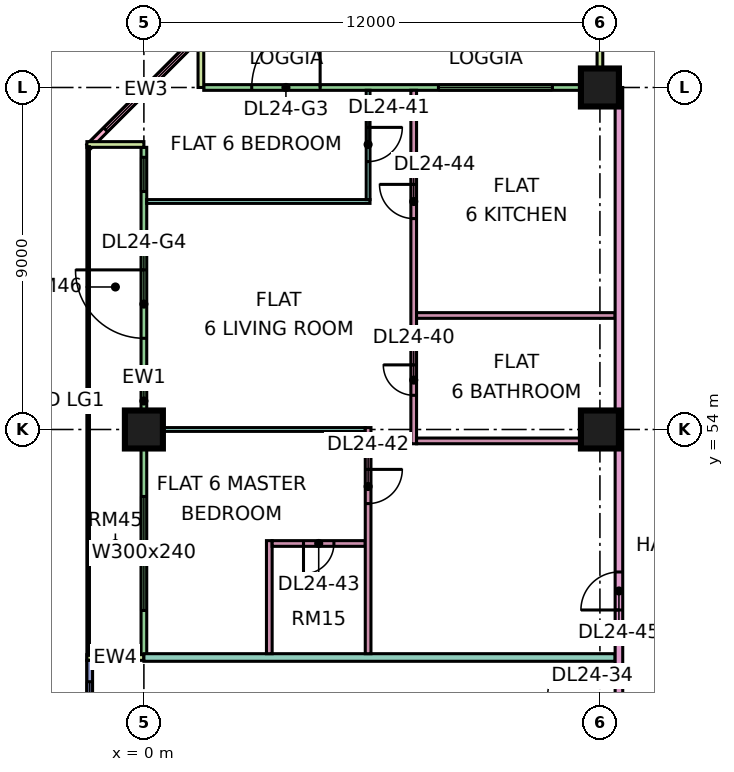
"""IFC4 building model, lengths in metres.
Left out: names, types, materials, properties, quantities, classifications, styles, units other than length and angle.
Written with IfcOpenShell. Run it as: python <this file> out.ifc"""

import sys

from ifc_helpers import new_model, si_unit, direction, frame, frame_2d, origin, origin_2d, place, context, subcontext, project, spatial, rectangle, extrude, element, fill, save


model = new_model("IFC4")
c1 = context("Model", 3, precision=1e-05, world=origin(), true_north=direction((0.0, 1.0)))
c2 = subcontext(c1, "Body", "Model", "MODEL_VIEW")
j1 = project(units=[si_unit("LENGTHUNIT", "METRE"), si_unit("PLANEANGLEUNIT", "RADIAN")], contexts=[c1])
p1 = place(None, origin())
s1 = spatial("IfcSite", under=j1, at=p1, CompositionType="ELEMENT")
p2 = place(p1, origin())
s2 = spatial("IfcBuilding", under=s1, at=p2, CompositionType="ELEMENT")
p3 = place(p2, frame((0.0, 0.0, 106.9)))
s3 = spatial("IfcBuildingStorey", under=s2, at=p3, CompositionType="ELEMENT", Elevation=106.9)
for number, where, z_axis, x_axis in (
    (1, (0.0, 54.0, 0.0), (0.0, 0.0, 1.0), (1.0, 0.0, 0.0)),
    (2, (12.0, 54.0, 0.0), (0.0, 0.0, 1.0), (1.0, 0.0, 0.0)),
    (3, (12.0, 63.0, 0.0), (0.0, 0.0, 1.0), (1.0, 0.0, 0.0)),
):
    element("IfcColumn", number, at=place(p3, frame(where, z_axis=z_axis, x_axis=x_axis)), inside=s3, PredefinedType="COLUMN", context=c2, shape_type="SweptSolid", body=[
        extrude(rectangle(XDim=1.0, YDim=1.0, at=origin_2d()), origin(), (0.0, 0.0, 1.0), 3.75),
    ])
p4 = place(p3, frame((11.925, 63.0, 0.0), z_axis=(0.0, 0.0, 1.0), x_axis=(-1.0, 0.0, 0.0)))
e4 = element("IfcWall", 4, at=p4, inside=s3, PredefinedType="SOLIDWALL", context=c2, shape_type="SweptSolid", body=[
    extrude(rectangle(XDim=10.35, YDim=0.15, at=frame_2d((5.175, 0.0))), origin(), (0.0, 0.0, 1.0), 3.35),
])
p5 = place(p4, frame((1.175, 0.0, 0.45)))
e5 = element("IfcOpeningElement", 5, at=p5, cuts=e4, PredefinedType="OPENING", context=c2, shape_type="SweptSolid", body=[
    extrude(rectangle(XDim=3.0, YDim=2.4, at=frame_2d((1.5, 1.2))), frame((0.0, 0.085, 0.0), z_axis=(0.0, -1.0, 0.0), x_axis=(1.0, 0.0, 0.0)), (0.0, 0.0, 1.0), 0.17),
])
p6 = place(p4, frame((7.288, 0.0, 0.0)))
e6 = element("IfcOpeningElement", 6, at=p6, cuts=e4, PredefinedType="OPENING", context=c2, shape_type="SweptSolid", body=[
    extrude(rectangle(XDim=1.8, YDim=2.4, at=frame_2d((0.9, 1.2))), frame((0.0, 0.085, 0.0), z_axis=(0.0, -1.0, 0.0), x_axis=(1.0, 0.0, 0.0)), (0.0, 0.0, 1.0), 0.17),
])
for number, where, z_axis, x_axis in (
    (7, (12.0, 64.5, 0.0), (0.0, 0.0, 1.0), (0.0, -1.0, 0.0)),
    (8, (1.5, 64.5, 0.0), (0.0, 0.0, 1.0), (0.0, -1.0, 0.0)),
):
    element("IfcWall", number, at=place(p3, frame(where, z_axis=z_axis, x_axis=x_axis)), inside=s3, PredefinedType="SOLIDWALL", context=c2, shape_type="SweptSolid", body=[
        extrude(rectangle(XDim=1.5, YDim=0.15, at=frame_2d((0.75, 0.0))), origin(), (0.0, 0.0, 1.0), 3.35),
    ])
p7 = place(p3, frame((1.553, 64.447, 0.0), z_axis=(0.0, 0.0, 1.0), x_axis=(-0.707106781187, -0.707106781187, 0.0)))
e9 = element("IfcWall", 9, at=p7, inside=s3, PredefinedType="SOLIDWALL", context=c2, shape_type="SweptSolid", body=[
    extrude(rectangle(XDim=4.243, YDim=0.15, at=frame_2d((2.121, 0.0))), origin(), (0.0, 0.0, 1.0), 3.35),
])
p8 = place(p7, frame((0.621, 0.0, 0.45)))
e10 = element("IfcOpeningElement", 10, at=p8, cuts=e9, PredefinedType="OPENING", context=c2, shape_type="SweptSolid", body=[
    extrude(rectangle(XDim=3.0, YDim=2.4, at=frame_2d((1.5, 1.2))), frame((0.0, 0.085, 0.0), z_axis=(0.0, -1.0, 0.0), x_axis=(1.0, 0.0, 0.0)), (0.0, 0.0, 1.0), 0.17),
])
p9 = place(p3, frame((0.0, 61.425, 0.0), z_axis=(0.0, 0.0, 1.0), x_axis=(0.0, -1.0, 0.0)))
e11 = element("IfcWall", 11, at=p9, inside=s3, PredefinedType="SOLIDWALL", context=c2, shape_type="SweptSolid", body=[
    extrude(rectangle(XDim=13.35, YDim=0.15, at=frame_2d((6.675, 0.0))), origin(), (0.0, 0.0, 1.0), 3.35),
])
p10 = place(p9, frame((0.262, 0.0, 0.45)))
e12 = element("IfcOpeningElement", 12, at=p10, cuts=e11, PredefinedType="OPENING", context=c2, shape_type="SweptSolid", body=[
    extrude(rectangle(XDim=0.9, YDim=2.4, at=frame_2d((0.45, 1.2))), frame((0.0, 0.085, 0.0), z_axis=(0.0, -1.0, 0.0), x_axis=(1.0, 0.0, 0.0)), (0.0, 0.0, 1.0), 0.17),
])
p11 = place(p9, frame((3.225, 0.0, 0.0)))
e13 = element("IfcOpeningElement", 13, at=p11, cuts=e11, PredefinedType="OPENING", context=c2, shape_type="SweptSolid", body=[
    extrude(rectangle(XDim=1.8, YDim=2.4, at=frame_2d((0.9, 1.2))), frame((0.0, 0.085, 0.0), z_axis=(0.0, -1.0, 0.0), x_axis=(1.0, 0.0, 0.0)), (0.0, 0.0, 1.0), 0.17),
])
p12 = place(p9, frame((9.188, 0.0, 0.45)))
e14 = element("IfcOpeningElement", 14, at=p12, cuts=e11, PredefinedType="OPENING", context=c2, shape_type="SweptSolid", body=[
    extrude(rectangle(XDim=3.0, YDim=2.4, at=frame_2d((1.5, 1.2))), frame((0.0, 0.085, 0.0), z_axis=(0.0, -1.0, 0.0), x_axis=(1.0, 0.0, 0.0)), (0.0, 0.0, 1.0), 0.17),
])
for number, where, z_axis, x_axis in (
    (15, (-1.5, 61.5, 0.0), (0.0, 0.0, 1.0), (1.0, 0.0, 0.0)),
    (16, (-1.5, 48.0, 0.0), (0.0, 0.0, 1.0), (1.0, 0.0, 0.0)),
):
    element("IfcWall", number, at=place(p3, frame(where, z_axis=z_axis, x_axis=x_axis)), inside=s3, PredefinedType="SOLIDWALL", context=c2, shape_type="SweptSolid", body=[
        extrude(rectangle(XDim=1.5, YDim=0.15, at=frame_2d((0.75, 0.0))), origin(), (0.0, 0.0, 1.0), 3.35),
    ])
p13 = place(p3, frame((-1.425, 47.925, 0.0), z_axis=(0.0, 0.0, 1.0), x_axis=(0.0, -1.0, 0.0)))
e17 = element("IfcWall", 17, at=p13, inside=s3, PredefinedType="SOLIDWALL", context=c2, shape_type="SweptSolid", body=[
    extrude(rectangle(XDim=11.85, YDim=0.15, at=frame_2d((5.925, 0.0))), origin(), (0.0, 0.0, 1.0), 3.35),
])
p14 = place(p13, frame((0.562, 0.0, 0.45)))
e18 = element("IfcOpeningElement", 18, at=p14, cuts=e17, PredefinedType="OPENING", context=c2, shape_type="SweptSolid", body=[
    extrude(rectangle(XDim=1.8, YDim=2.4, at=frame_2d((0.9, 1.2))), frame((0.0, 0.085, 0.0), z_axis=(0.0, -1.0, 0.0), x_axis=(1.0, 0.0, 0.0)), (0.0, 0.0, 1.0), 0.17),
])
p15 = place(p13, frame((4.425, 0.0, 0.45)))
e19 = element("IfcOpeningElement", 19, at=p15, cuts=e17, PredefinedType="OPENING", context=c2, shape_type="SweptSolid", body=[
    extrude(rectangle(XDim=3.0, YDim=2.4, at=frame_2d((1.5, 1.2))), frame((0.0, 0.085, 0.0), z_axis=(0.0, -1.0, 0.0), x_axis=(1.0, 0.0, 0.0)), (0.0, 0.0, 1.0), 0.17),
])
p16 = place(p13, frame((9.488, 0.0, 0.45)))
e20 = element("IfcOpeningElement", 20, at=p16, cuts=e17, PredefinedType="OPENING", context=c2, shape_type="SweptSolid", body=[
    extrude(rectangle(XDim=1.8, YDim=2.4, at=frame_2d((0.9, 1.2))), frame((0.0, 0.085, 0.0), z_axis=(0.0, -1.0, 0.0), x_axis=(1.0, 0.0, 0.0)), (0.0, 0.0, 1.0), 0.17),
])
p17 = place(p3, frame((0.0, 48.0, 0.0), z_axis=(0.0, 0.0, 1.0), x_axis=(1.0, 0.0, 0.0)))
e21 = element("IfcWall", 21, at=p17, inside=s3, PredefinedType="PARTITIONING", context=c2, shape_type="SweptSolid", body=[
    extrude(rectangle(XDim=12.4, YDim=0.2, at=frame_2d((6.2, 0.0))), origin(), (0.0, 0.0, 1.0), 3.35),
])
p18 = place(p3, frame((0.074, 54.0, 0.0), z_axis=(0.0, 0.0, 1.0), x_axis=(1.0, 0.0, 0.0)))
e22 = element("IfcWall", 22, at=p18, inside=s3, PredefinedType="PARTITIONING", context=c2, shape_type="SweptSolid", body=[
    extrude(rectangle(XDim=5.751, YDim=0.1, at=frame_2d((2.875, 0.0))), origin(), (0.0, 0.0, 1.0), 3.35),
])
p19 = place(p3, frame((0.074, 60.0, 0.0), z_axis=(0.0, 0.0, 1.0), x_axis=(1.0, 0.0, 0.0)))
e23 = element("IfcWall", 23, at=p19, inside=s3, PredefinedType="PARTITIONING", context=c2, shape_type="SweptSolid", body=[
    extrude(rectangle(XDim=5.876, YDim=0.1, at=frame_2d((2.938, 0.0))), origin(), (0.0, 0.0, 1.0), 3.35),
])
p20 = place(p3, frame((3.3, 48.1, 0.0), z_axis=(0.0, 0.0, 1.0), x_axis=(0.0, 1.0, 0.0)))
e24 = element("IfcWall", 24, at=p20, inside=s3, PredefinedType="PARTITIONING", context=c2, shape_type="SweptSolid", body=[
    extrude(rectangle(XDim=2.975, YDim=0.15, at=frame_2d((1.487, 0.0))), origin(), (0.0, 0.0, 1.0), 3.35),
])
p21 = place(p3, frame((3.375, 51.0, 0.0), z_axis=(0.0, 0.0, 1.0), x_axis=(1.0, 0.0, 0.0)))
e25 = element("IfcWall", 25, at=p21, inside=s3, PredefinedType="PARTITIONING", context=c2, shape_type="SweptSolid", body=[
    extrude(rectangle(XDim=2.45, YDim=0.15, at=frame_2d((1.225, 0.0))), origin(), (0.0, 0.0, 1.0), 3.35),
])
p22 = place(p21, frame((0.825, 0.0, 0.0)))
e26 = element("IfcOpeningElement", 26, at=p22, cuts=e25, PredefinedType="OPENING", context=c2, shape_type="SweptSolid", body=[
    extrude(rectangle(XDim=0.8, YDim=2.1, at=frame_2d((0.4, 1.05))), frame((0.0, 0.085, 0.0), z_axis=(0.0, -1.0, 0.0), x_axis=(1.0, 0.0, 0.0)), (0.0, 0.0, 1.0), 0.17),
])
p23 = place(p3, frame((5.9, 48.1, 0.0), z_axis=(0.0, 0.0, 1.0), x_axis=(0.0, 1.0, 0.0)))
e27 = element("IfcWall", 27, at=p23, inside=s3, PredefinedType="PARTITIONING", context=c2, shape_type="SweptSolid", body=[
    extrude(rectangle(XDim=5.95, YDim=0.15, at=frame_2d((2.975, 0.0))), origin(), (0.0, 0.0, 1.0), 3.35),
])
p24 = place(p23, frame((3.95, 0.0, 0.0)))
e28 = element("IfcOpeningElement", 28, at=p24, cuts=e27, PredefinedType="OPENING", context=c2, shape_type="SweptSolid", body=[
    extrude(rectangle(XDim=0.9, YDim=2.1, at=frame_2d((0.45, 1.05))), frame((0.0, 0.085, 0.0), z_axis=(0.0, -1.0, 0.0), x_axis=(1.0, 0.0, 0.0)), (0.0, 0.0, 1.0), 0.17),
])
p25 = place(p3, frame((5.9, 60.05, 0.0), z_axis=(0.0, 0.0, 1.0), x_axis=(0.0, 1.0, 0.0)))
e29 = element("IfcWall", 29, at=p25, inside=s3, PredefinedType="PARTITIONING", context=c2, shape_type="SweptSolid", body=[
    extrude(rectangle(XDim=2.876, YDim=0.1, at=frame_2d((1.438, 0.0))), origin(), (0.0, 0.0, 1.0), 3.35),
])
p26 = place(p25, frame((1.0, 0.0, 0.0)))
e30 = element("IfcOpeningElement", 30, at=p26, cuts=e29, PredefinedType="OPENING", context=c2, shape_type="SweptSolid", body=[
    extrude(rectangle(XDim=0.9, YDim=2.1, at=frame_2d((0.45, 1.05))), frame((0.0, 0.06, 0.0), z_axis=(0.0, -1.0, 0.0), x_axis=(1.0, 0.0, 0.0)), (0.0, 0.0, 1.0), 0.12),
])
p27 = place(p3, frame((7.1, 53.625, 0.0), z_axis=(0.0, 0.0, 1.0), x_axis=(0.0, 1.0, 0.0)))
e31 = element("IfcWall", 31, at=p27, inside=s3, PredefinedType="PARTITIONING", context=c2, shape_type="SweptSolid", body=[
    extrude(rectangle(XDim=9.301, YDim=0.15, at=frame_2d((4.65, 0.0))), origin(), (0.0, 0.0, 1.0), 3.35),
])
p28 = place(p27, frame((1.275, 0.0, 0.0)))
e32 = element("IfcOpeningElement", 32, at=p28, cuts=e31, PredefinedType="OPENING", context=c2, shape_type="SweptSolid", body=[
    extrude(rectangle(XDim=0.8, YDim=2.1, at=frame_2d((0.4, 1.05))), frame((0.0, 0.085, 0.0), z_axis=(0.0, -1.0, 0.0), x_axis=(1.0, 0.0, 0.0)), (0.0, 0.0, 1.0), 0.17),
])
p29 = place(p27, frame((5.925, 0.0, 0.0)))
e33 = element("IfcOpeningElement", 33, at=p29, cuts=e31, PredefinedType="OPENING", context=c2, shape_type="SweptSolid", body=[
    extrude(rectangle(XDim=0.9, YDim=2.1, at=frame_2d((0.45, 1.05))), frame((0.0, 0.085, 0.0), z_axis=(0.0, -1.0, 0.0), x_axis=(1.0, 0.0, 0.0)), (0.0, 0.0, 1.0), 0.17),
])
for number, where, z_axis, x_axis in (
    (34, (7.175, 53.7, 0.0), (0.0, 0.0, 1.0), (1.0, 0.0, 0.0)),
    (35, (7.175, 57.0, 0.0), (0.0, 0.0, 1.0), (1.0, 0.0, 0.0)),
):
    element("IfcWall", number, at=place(p3, frame(where, z_axis=z_axis, x_axis=x_axis)), inside=s3, PredefinedType="PARTITIONING", context=c2, shape_type="SweptSolid", body=[
        extrude(rectangle(XDim=5.225, YDim=0.15, at=frame_2d((2.612, 0.0))), origin(), (0.0, 0.0, 1.0), 3.35),
    ])
p30 = place(p3, frame((12.5, 20.0, 0.0), z_axis=(0.0, 0.0, 1.0), x_axis=(0.0, 1.0, 0.0)))
e36 = element("IfcWall", 36, at=p30, inside=s3, PredefinedType="PARTITIONING", context=c2, shape_type="SweptSolid", body=[
    extrude(rectangle(XDim=43.0, YDim=0.2, at=frame_2d((21.5, 0.0))), origin(), (0.0, 0.0, 1.0), 3.35),
])
p31 = place(p30, frame((25.95, 0.0, 0.0)))
e37 = element("IfcOpeningElement", 37, at=p31, cuts=e36, PredefinedType="OPENING", context=c2, shape_type="SweptSolid", body=[
    extrude(rectangle(XDim=1.0, YDim=2.1, at=frame_2d((0.5, 1.05))), frame((0.0, 0.11, 0.0), z_axis=(0.0, -1.0, 0.0), x_axis=(1.0, 0.0, 0.0)), (0.0, 0.0, 1.0), 0.22),
])
p32 = place(p30, frame((29.25, 0.0, 0.0)))
e38 = element("IfcOpeningElement", 38, at=p32, cuts=e36, PredefinedType="OPENING", context=c2, shape_type="SweptSolid", body=[
    extrude(rectangle(XDim=1.0, YDim=2.1, at=frame_2d((0.5, 1.05))), frame((0.0, 0.11, 0.0), z_axis=(0.0, -1.0, 0.0), x_axis=(1.0, 0.0, 0.0)), (0.0, 0.0, 1.0), 0.22),
])
p33 = place(p30, frame((0.6, 0.0, 0.0)))
e39 = element("IfcOpeningElement", 39, at=p33, cuts=e36, PredefinedType="OPENING", context=c2, shape_type="SweptSolid", body=[
    extrude(rectangle(XDim=1.2, YDim=2.1, at=frame_2d((0.6, 1.05))), frame((0.0, 0.11, 0.0), z_axis=(0.0, -1.0, 0.0), x_axis=(1.0, 0.0, 0.0)), (0.0, 0.0, 1.0), 0.22),
])
p34 = place(p30, frame((4.65, 0.0, 0.0)))
e40 = element("IfcOpeningElement", 40, at=p34, cuts=e36, PredefinedType="OPENING", context=c2, shape_type="SweptSolid", body=[
    extrude(rectangle(XDim=1.0, YDim=2.1, at=frame_2d((0.5, 1.05))), frame((0.0, 0.11, 0.0), z_axis=(0.0, -1.0, 0.0), x_axis=(1.0, 0.0, 0.0)), (0.0, 0.0, 1.0), 0.22),
])
p35 = place(p5, origin())
e41 = element("IfcWindow", 41, at=p35, inside=s3, PartitioningType="SINGLE_PANEL", PredefinedType="WINDOW", context=c2, shape_type="SweptSolid", body=[
    extrude(rectangle(XDim=3.0, YDim=2.4, at=frame_2d((1.5, 1.2))), frame((0.0, 0.03, 0.0), z_axis=(0.0, -1.0, 0.0), x_axis=(1.0, 0.0, 0.0)), (0.0, 0.0, 1.0), 0.06),
])
fill(e5, e41)
p36 = place(p6, frame((1.8, 0.0, 0.0), z_axis=(0.0, 0.0, 1.0), x_axis=(-1.0, 0.0, 0.0)))
e42 = element("IfcDoor", 42, at=p36, inside=s3, OperationType="DOUBLE_DOOR_SINGLE_SWING", PredefinedType="DOOR", context=c2, shape_type="SweptSolid", body=[
    extrude(rectangle(XDim=1.8, YDim=2.4, at=frame_2d((0.9, 1.2))), frame((0.0, 0.025, 0.0), z_axis=(0.0, -1.0, 0.0), x_axis=(1.0, 0.0, 0.0)), (0.0, 0.0, 1.0), 0.05),
])
fill(e6, e42)
p37 = place(p8, origin())
e43 = element("IfcWindow", 43, at=p37, inside=s3, PartitioningType="SINGLE_PANEL", PredefinedType="WINDOW", context=c2, shape_type="SweptSolid", body=[
    extrude(rectangle(XDim=3.0, YDim=2.4, at=frame_2d((1.5, 1.2))), frame((0.0, 0.03, 0.0), z_axis=(0.0, -1.0, 0.0), x_axis=(1.0, 0.0, 0.0)), (0.0, 0.0, 1.0), 0.06),
])
fill(e10, e43)
p38 = place(p10, origin())
e44 = element("IfcWindow", 44, at=p38, inside=s3, PartitioningType="SINGLE_PANEL", PredefinedType="WINDOW", context=c2, shape_type="SweptSolid", body=[
    extrude(rectangle(XDim=0.9, YDim=2.4, at=frame_2d((0.45, 1.2))), frame((0.0, 0.03, 0.0), z_axis=(0.0, -1.0, 0.0), x_axis=(1.0, 0.0, 0.0)), (0.0, 0.0, 1.0), 0.06),
])
fill(e12, e44)
p39 = place(p11, frame((1.8, 0.0, 0.0), z_axis=(0.0, 0.0, 1.0), x_axis=(-1.0, 0.0, 0.0)))
e45 = element("IfcDoor", 45, at=p39, inside=s3, OperationType="DOUBLE_DOOR_SINGLE_SWING", PredefinedType="DOOR", context=c2, shape_type="SweptSolid", body=[
    extrude(rectangle(XDim=1.8, YDim=2.4, at=frame_2d((0.9, 1.2))), frame((0.0, 0.025, 0.0), z_axis=(0.0, -1.0, 0.0), x_axis=(1.0, 0.0, 0.0)), (0.0, 0.0, 1.0), 0.05),
])
fill(e13, e45)
p40 = place(p12, origin())
e46 = element("IfcWindow", 46, at=p40, inside=s3, PartitioningType="SINGLE_PANEL", PredefinedType="WINDOW", context=c2, shape_type="SweptSolid", body=[
    extrude(rectangle(XDim=3.0, YDim=2.4, at=frame_2d((1.5, 1.2))), frame((0.0, 0.03, 0.0), z_axis=(0.0, -1.0, 0.0), x_axis=(1.0, 0.0, 0.0)), (0.0, 0.0, 1.0), 0.06),
])
fill(e14, e46)
p41 = place(p14, origin())
e47 = element("IfcWindow", 47, at=p41, inside=s3, PartitioningType="SINGLE_PANEL", PredefinedType="WINDOW", context=c2, shape_type="SweptSolid", body=[
    extrude(rectangle(XDim=1.8, YDim=2.4, at=frame_2d((0.9, 1.2))), frame((0.0, 0.03, 0.0), z_axis=(0.0, -1.0, 0.0), x_axis=(1.0, 0.0, 0.0)), (0.0, 0.0, 1.0), 0.06),
])
fill(e18, e47)
p42 = place(p28, frame((0.8, 0.0, 0.0), z_axis=(0.0, 0.0, 1.0), x_axis=(-1.0, 0.0, 0.0)))
e48 = element("IfcDoor", 48, at=p42, inside=s3, OperationType="SINGLE_SWING_RIGHT", PredefinedType="DOOR", context=c2, shape_type="SweptSolid", body=[
    extrude(rectangle(XDim=0.8, YDim=2.1, at=frame_2d((0.4, 1.05))), frame((0.0, 0.025, 0.0), z_axis=(0.0, -1.0, 0.0), x_axis=(1.0, 0.0, 0.0)), (0.0, 0.0, 1.0), 0.05),
])
fill(e32, e48)
p43 = place(p26, origin())
e49 = element("IfcDoor", 49, at=p43, inside=s3, OperationType="SINGLE_SWING_RIGHT", PredefinedType="DOOR", context=c2, shape_type="SweptSolid", body=[
    extrude(rectangle(XDim=0.9, YDim=2.1, at=frame_2d((0.45, 1.05))), frame((0.0, 0.025, 0.0), z_axis=(0.0, -1.0, 0.0), x_axis=(1.0, 0.0, 0.0)), (0.0, 0.0, 1.0), 0.05),
])
fill(e30, e49)
p44 = place(p24, origin())
e50 = element("IfcDoor", 50, at=p44, inside=s3, OperationType="SINGLE_SWING_RIGHT", PredefinedType="DOOR", context=c2, shape_type="SweptSolid", body=[
    extrude(rectangle(XDim=0.9, YDim=2.1, at=frame_2d((0.45, 1.05))), frame((0.0, 0.025, 0.0), z_axis=(0.0, -1.0, 0.0), x_axis=(1.0, 0.0, 0.0)), (0.0, 0.0, 1.0), 0.05),
])
fill(e28, e50)
p45 = place(p22, frame((0.8, 0.0, 0.0), z_axis=(0.0, 0.0, 1.0), x_axis=(-1.0, 0.0, 0.0)))
e51 = element("IfcDoor", 51, at=p45, inside=s3, OperationType="SINGLE_SWING_LEFT", PredefinedType="DOOR", context=c2, shape_type="SweptSolid", body=[
    extrude(rectangle(XDim=0.8, YDim=2.1, at=frame_2d((0.4, 1.05))), frame((0.0, 0.025, 0.0), z_axis=(0.0, -1.0, 0.0), x_axis=(1.0, 0.0, 0.0)), (0.0, 0.0, 1.0), 0.05),
])
fill(e26, e51)
p46 = place(p29, frame((0.9, 0.0, 0.0), z_axis=(0.0, 0.0, 1.0), x_axis=(-1.0, 0.0, 0.0)))
e52 = element("IfcDoor", 52, at=p46, inside=s3, OperationType="SINGLE_SWING_RIGHT", PredefinedType="DOOR", context=c2, shape_type="SweptSolid", body=[
    extrude(rectangle(XDim=0.9, YDim=2.1, at=frame_2d((0.45, 1.05))), frame((0.0, 0.025, 0.0), z_axis=(0.0, -1.0, 0.0), x_axis=(1.0, 0.0, 0.0)), (0.0, 0.0, 1.0), 0.05),
])
fill(e33, e52)
p47 = place(p32, origin())
e53 = element("IfcDoor", 53, at=p47, inside=s3, OperationType="SINGLE_SWING_LEFT", PredefinedType="DOOR", context=c2, shape_type="SweptSolid", body=[
    extrude(rectangle(XDim=1.0, YDim=2.1, at=frame_2d((0.5, 1.05))), frame((0.0, 0.025, 0.0), z_axis=(0.0, -1.0, 0.0), x_axis=(1.0, 0.0, 0.0)), (0.0, 0.0, 1.0), 0.05),
])
fill(e38, e53)
save(model, sys.argv[1])
